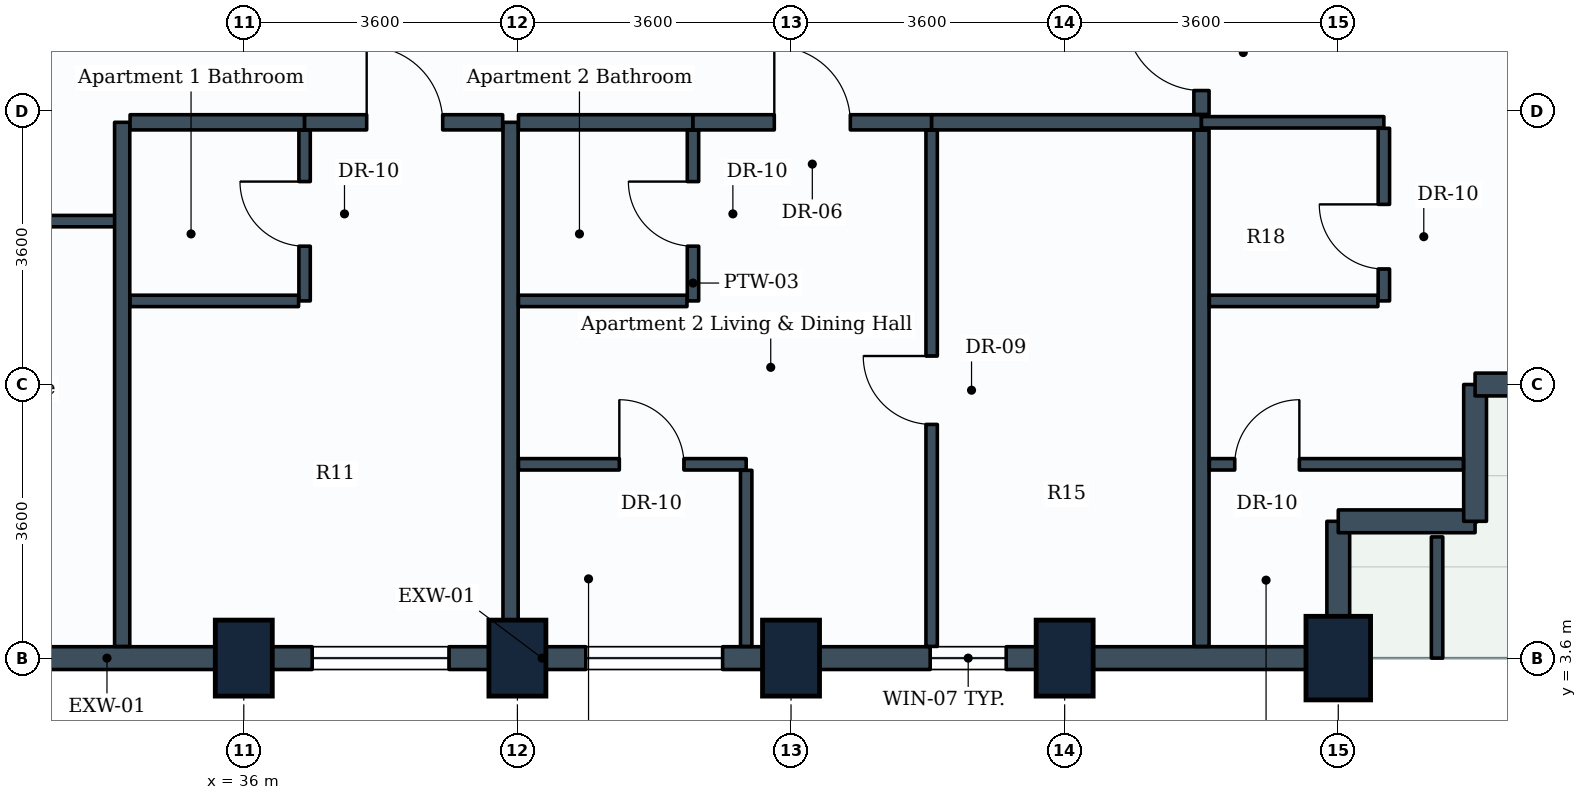
"""IFC4 building model, lengths in metres.
Left out: names, types, materials, properties, quantities, classifications, styles, units other than length and angle.
Written with IfcOpenShell. Run it as: python <this file> out.ifc"""

import sys

from ifc_helpers import new_model, si_unit, direction, frame, frame_2d, origin, origin_2d, place, context, subcontext, project, spatial, rectangle, extrude, element, fill, save


model = new_model("IFC4")
c1 = context("Model", 3, precision=1e-05, world=origin(), true_north=direction((0.0, 1.0)))
c2 = subcontext(c1, "Body", "Model", "MODEL_VIEW")
j1 = project(units=[si_unit("LENGTHUNIT", "METRE"), si_unit("PLANEANGLEUNIT", "RADIAN")], contexts=[c1])
p1 = place(None, origin())
s1 = spatial("IfcSite", under=j1, at=p1, CompositionType="ELEMENT")
p2 = place(p1, origin())
s2 = spatial("IfcBuilding", under=s1, at=p2, CompositionType="ELEMENT")
p3 = place(p2, frame((0.0, 0.0, 127.6)))
s3 = spatial("IfcBuildingStorey", under=s2, at=p3, CompositionType="ELEMENT", Elevation=127.6)
for number, where, z_axis, x_axis in (
    (1, (36.0, 3.6, 0.0), (0.0, 0.0, 1.0), (1.0, 0.0, 0.0)),
    (2, (39.6, 3.6, 0.0), (0.0, 0.0, 1.0), (1.0, 0.0, 0.0)),
    (3, (43.2, 3.6, 0.0), (0.0, 0.0, 1.0), (1.0, 0.0, 0.0)),
    (4, (46.8, 3.6, 0.0), (0.0, 0.0, 1.0), (1.0, 0.0, 0.0)),
):
    element("IfcColumn", number, at=place(p3, frame(where, z_axis=z_axis, x_axis=x_axis)), inside=s3, PredefinedType="COLUMN", context=c2, shape_type="SweptSolid", body=[
        extrude(rectangle(XDim=0.75, YDim=1.0, at=origin_2d()), origin(), (0.0, 0.0, 1.0), 3.8),
    ])
p4 = place(p3, frame((50.4, 3.6, 0.0), z_axis=(0.0, 0.0, 1.0), x_axis=(1.0, 0.0, 0.0)))
e5 = element("IfcColumn", 5, at=p4, inside=s3, PredefinedType="COLUMN", context=c2, shape_type="SweptSolid", body=[
    extrude(rectangle(XDim=0.85, YDim=1.1, at=origin_2d()), origin(), (0.0, 0.0, 1.0), 3.8),
])
p5 = place(p3, frame((36.0, 3.6, 0.0), z_axis=(0.0, 0.0, 1.0), x_axis=(-1.0, 0.0, 0.0)))
e6 = element("IfcWall", 6, at=p5, inside=s3, PredefinedType="STANDARD", context=c2, shape_type="SweptSolid", body=[
    extrude(rectangle(XDim=3.6, YDim=0.3, at=frame_2d((1.8, 0.0))), origin(), (0.0, 0.0, 1.0), 2.93),
])
p6 = place(p3, frame((39.6, 3.6, 0.0), z_axis=(0.0, 0.0, 1.0), x_axis=(-1.0, 0.0, 0.0)))
e7 = element("IfcWall", 7, at=p6, inside=s3, PredefinedType="STANDARD", context=c2, shape_type="SweptSolid", body=[
    extrude(rectangle(XDim=3.6, YDim=0.3, at=frame_2d((1.8, 0.0))), origin(), (0.0, 0.0, 1.0), 2.93),
])
p7 = place(p6, frame((0.9, 0.0, 0.85)))
e8 = element("IfcOpeningElement", 8, at=p7, cuts=e7, PredefinedType="OPENING", context=c2, shape_type="SweptSolid", body=[
    extrude(rectangle(XDim=1.8, YDim=1.35, at=frame_2d((0.9, 0.675))), frame((0.0, 0.16, 0.0), z_axis=(0.0, -1.0, 0.0), x_axis=(1.0, 0.0, 0.0)), (0.0, 0.0, 1.0), 0.32),
])
p8 = place(p3, frame((43.2, 3.6, 0.0), z_axis=(0.0, 0.0, 1.0), x_axis=(-1.0, 0.0, 0.0)))
e9 = element("IfcWall", 9, at=p8, inside=s3, PredefinedType="STANDARD", context=c2, shape_type="SweptSolid", body=[
    extrude(rectangle(XDim=3.6, YDim=0.3, at=frame_2d((1.8, 0.0))), origin(), (0.0, 0.0, 1.0), 2.93),
])
p9 = place(p8, frame((0.9, 0.0, 0.85)))
e10 = element("IfcOpeningElement", 10, at=p9, cuts=e9, PredefinedType="OPENING", context=c2, shape_type="SweptSolid", body=[
    extrude(rectangle(XDim=1.8, YDim=1.35, at=frame_2d((0.9, 0.675))), frame((0.0, 0.16, 0.0), z_axis=(0.0, -1.0, 0.0), x_axis=(1.0, 0.0, 0.0)), (0.0, 0.0, 1.0), 0.32),
])
p10 = place(p3, frame((46.8, 3.6, 0.0), z_axis=(0.0, 0.0, 1.0), x_axis=(-1.0, 0.0, 0.0)))
e11 = element("IfcWall", 11, at=p10, inside=s3, PredefinedType="STANDARD", context=c2, shape_type="SweptSolid", body=[
    extrude(rectangle(XDim=3.6, YDim=0.3, at=frame_2d((1.8, 0.0))), origin(), (0.0, 0.0, 1.0), 2.93),
])
p11 = place(p10, frame((0.769, 0.0, 0.85)))
e12 = element("IfcOpeningElement", 12, at=p11, cuts=e11, PredefinedType="OPENING", context=c2, shape_type="SweptSolid", body=[
    extrude(rectangle(XDim=1.0, YDim=1.35, at=frame_2d((0.5, 0.675))), frame((0.0, 0.16, 0.0), z_axis=(0.0, -1.0, 0.0), x_axis=(1.0, 0.0, 0.0)), (0.0, 0.0, 1.0), 0.32),
])
p12 = place(p3, frame((50.4, 3.6, 0.0), z_axis=(0.0, 0.0, 1.0), x_axis=(-1.0, 0.0, 0.0)))
e13 = element("IfcWall", 13, at=p12, inside=s3, PredefinedType="STANDARD", context=c2, shape_type="SweptSolid", body=[
    extrude(rectangle(XDim=3.6, YDim=0.3, at=frame_2d((1.8, 0.0))), origin(), (0.0, 0.0, 1.0), 2.93),
])
p13 = place(p3, frame((50.4, 5.4, 0.0), z_axis=(0.0, 0.0, 1.0), x_axis=(0.0, -1.0, 0.0)))
e14 = element("IfcWall", 14, at=p13, inside=s3, PredefinedType="STANDARD", context=c2, shape_type="SweptSolid", body=[
    extrude(rectangle(XDim=1.8, YDim=0.3, at=frame_2d((0.9, 0.0))), origin(), (0.0, 0.0, 1.0), 2.93),
])
for number, where, z_axis, x_axis in (
    (15, (52.2, 5.4, 0.0), (0.0, 0.0, 1.0), (-1.0, 0.0, 0.0)),
    (16, (52.2, 7.2, 0.0), (0.0, 0.0, 1.0), (0.0, -1.0, 0.0)),
):
    element("IfcWall", number, at=place(p3, frame(where, z_axis=z_axis, x_axis=x_axis)), inside=s3, PredefinedType="STANDARD", context=c2, shape_type="SweptSolid", body=[
        extrude(rectangle(XDim=1.8, YDim=0.3, at=frame_2d((0.9, 0.0))), origin(), (0.0, 0.0, 1.0), 3.535),
    ])
p14 = place(p3, frame((54.0, 7.2, 0.0), z_axis=(0.0, 0.0, 1.0), x_axis=(-1.0, 0.0, 0.0)))
e17 = element("IfcWall", 17, at=p14, inside=s3, PredefinedType="STANDARD", context=c2, shape_type="SweptSolid", body=[
    extrude(rectangle(XDim=1.8, YDim=0.3, at=frame_2d((0.9, 0.0))), origin(), (0.0, 0.0, 1.0), 2.93),
])
p15 = place(p3, frame((28.879, 9.35, 0.0), z_axis=(0.0, 0.0, 1.0), x_axis=(1.0, 0.0, 0.0)))
e18 = element("IfcWall", 18, at=p15, inside=s3, PredefinedType="PARTITIONING", context=c2, shape_type="SweptSolid", body=[
    extrude(rectangle(XDim=5.521, YDim=0.15, at=frame_2d((2.76, 0.0))), origin(), (0.0, 0.0, 1.0), 3.535),
])
p16 = place(p15, frame((0.36, 0.0, 0.0)))
e19 = element("IfcOpeningElement", 19, at=p16, cuts=e18, PredefinedType="OPENING", context=c2, shape_type="SweptSolid", body=[
    extrude(rectangle(XDim=1.0, YDim=2.1, at=frame_2d((0.5, 1.05))), frame((0.0, 0.085, 0.0), z_axis=(0.0, -1.0, 0.0), x_axis=(1.0, 0.0, 0.0)), (0.0, 0.0, 1.0), 0.17),
])
for number, where, z_axis, x_axis in (
    (20, (34.4, 3.754, 0.0), (0.0, 0.0, 1.0), (0.0, 1.0, 0.0)),
    (21, (39.51, 3.754, 0.0), (0.0, 0.0, 1.0), (0.0, 1.0, 0.0)),
):
    element("IfcWall", number, at=place(p3, frame(where, z_axis=z_axis, x_axis=x_axis)), inside=s3, PredefinedType="PARTITIONING", context=c2, shape_type="SweptSolid", body=[
        extrude(rectangle(XDim=6.896, YDim=0.2, at=frame_2d((3.448, 0.0))), origin(), (0.0, 0.0, 1.0), 2.93),
    ])
p17 = place(p3, frame((34.504, 10.65, 0.0), z_axis=(0.0, 0.0, 1.0), x_axis=(1.0, 0.0, 0.0)))
e22 = element("IfcWall", 22, at=p17, inside=s3, PredefinedType="PARTITIONING", context=c2, shape_type="SweptSolid", body=[
    extrude(rectangle(XDim=2.296, YDim=0.2, at=frame_2d((1.148, 0.0))), origin(), (0.0, 0.0, 1.0), 3.08),
])
p18 = place(p3, frame((36.8, 8.3, 0.0), z_axis=(0.0, 0.0, 1.0), x_axis=(0.0, 1.0, 0.0)))
e23 = element("IfcWall", 23, at=p18, inside=s3, PredefinedType="PARTITIONING", context=c2, shape_type="SweptSolid", body=[
    extrude(rectangle(XDim=2.246, YDim=0.15, at=frame_2d((1.123, 0.0))), origin(), (0.0, 0.0, 1.0), 3.535),
])
p19 = place(p18, frame((0.72, 0.0, 0.0)))
e24 = element("IfcOpeningElement", 24, at=p19, cuts=e23, PredefinedType="OPENING", context=c2, shape_type="SweptSolid", body=[
    extrude(rectangle(XDim=0.85, YDim=2.1, at=frame_2d((0.425, 1.05))), frame((0.0, 0.085, 0.0), z_axis=(0.0, -1.0, 0.0), x_axis=(1.0, 0.0, 0.0)), (0.0, 0.0, 1.0), 0.17),
])
p20 = place(p3, frame((34.504, 8.3, 0.0), z_axis=(0.0, 0.0, 1.0), x_axis=(1.0, 0.0, 0.0)))
e25 = element("IfcWall", 25, at=p20, inside=s3, PredefinedType="PARTITIONING", context=c2, shape_type="SweptSolid", body=[
    extrude(rectangle(XDim=2.217, YDim=0.15, at=frame_2d((1.108, 0.0))), origin(), (0.0, 0.0, 1.0), 3.22),
])
p21 = place(p3, frame((36.8, 10.65, 0.0), z_axis=(0.0, 0.0, 1.0), x_axis=(1.0, 0.0, 0.0)))
e26 = element("IfcWall", 26, at=p21, inside=s3, PredefinedType="PARTITIONING", context=c2, shape_type="SweptSolid", body=[
    extrude(rectangle(XDim=2.606, YDim=0.2, at=frame_2d((1.303, 0.0))), origin(), (0.0, 0.0, 1.0), 3.08),
])
p22 = place(p21, frame((0.817, 0.0, 0.0)))
e27 = element("IfcOpeningElement", 27, at=p22, cuts=e26, PredefinedType="OPENING", context=c2, shape_type="SweptSolid", body=[
    extrude(rectangle(XDim=1.0, YDim=2.1, at=frame_2d((0.5, 1.05))), frame((0.0, 0.11, 0.0), z_axis=(0.0, -1.0, 0.0), x_axis=(1.0, 0.0, 0.0)), (0.0, 0.0, 1.0), 0.22),
])
p23 = place(p3, frame((39.614, 10.65, 0.0), z_axis=(0.0, 0.0, 1.0), x_axis=(1.0, 0.0, 0.0)))
e28 = element("IfcWall", 28, at=p23, inside=s3, PredefinedType="PARTITIONING", context=c2, shape_type="SweptSolid", body=[
    extrude(rectangle(XDim=2.296, YDim=0.2, at=frame_2d((1.148, 0.0))), origin(), (0.0, 0.0, 1.0), 3.13),
])
p24 = place(p3, frame((41.91, 8.3, 0.0), z_axis=(0.0, 0.0, 1.0), x_axis=(0.0, 1.0, 0.0)))
e29 = element("IfcWall", 29, at=p24, inside=s3, PredefinedType="PARTITIONING", context=c2, shape_type="SweptSolid", body=[
    extrude(rectangle(XDim=2.246, YDim=0.15, at=frame_2d((1.123, 0.0))), origin(), (0.0, 0.0, 1.0), 3.535),
])
p25 = place(p24, frame((0.72, 0.0, 0.0)))
e30 = element("IfcOpeningElement", 30, at=p25, cuts=e29, PredefinedType="OPENING", context=c2, shape_type="SweptSolid", body=[
    extrude(rectangle(XDim=0.85, YDim=2.1, at=frame_2d((0.425, 1.05))), frame((0.0, 0.085, 0.0), z_axis=(0.0, -1.0, 0.0), x_axis=(1.0, 0.0, 0.0)), (0.0, 0.0, 1.0), 0.17),
])
p26 = place(p3, frame((39.614, 8.3, 0.0), z_axis=(0.0, 0.0, 1.0), x_axis=(1.0, 0.0, 0.0)))
e31 = element("IfcWall", 31, at=p26, inside=s3, PredefinedType="PARTITIONING", context=c2, shape_type="SweptSolid", body=[
    extrude(rectangle(XDim=2.217, YDim=0.15, at=frame_2d((1.108, 0.0))), origin(), (0.0, 0.0, 1.0), 3.17),
])
p27 = place(p3, frame((41.91, 10.65, 0.0), z_axis=(0.0, 0.0, 1.0), x_axis=(1.0, 0.0, 0.0)))
e32 = element("IfcWall", 32, at=p27, inside=s3, PredefinedType="PARTITIONING", context=c2, shape_type="SweptSolid", body=[
    extrude(rectangle(XDim=3.14, YDim=0.2, at=frame_2d((1.57, 0.0))), origin(), (0.0, 0.0, 1.0), 3.13),
])
p28 = place(p27, frame((1.07, 0.0, 0.0)))
e33 = element("IfcOpeningElement", 33, at=p28, cuts=e32, PredefinedType="OPENING", context=c2, shape_type="SweptSolid", body=[
    extrude(rectangle(XDim=1.0, YDim=2.1, at=frame_2d((0.5, 1.05))), frame((0.0, 0.11, 0.0), z_axis=(0.0, -1.0, 0.0), x_axis=(1.0, 0.0, 0.0)), (0.0, 0.0, 1.0), 0.22),
])
p29 = place(p3, frame((45.05, 10.65, 0.0), z_axis=(0.0, 0.0, 1.0), x_axis=(1.0, 0.0, 0.0)))
e34 = element("IfcWall", 34, at=p29, inside=s3, PredefinedType="PARTITIONING", context=c2, shape_type="SweptSolid", body=[
    extrude(rectangle(XDim=3.55, YDim=0.2, at=frame_2d((1.775, 0.0))), origin(), (0.0, 0.0, 1.0), 3.17),
])
p30 = place(p3, frame((45.05, 3.754, 0.0), z_axis=(0.0, 0.0, 1.0), x_axis=(0.0, 1.0, 0.0)))
e35 = element("IfcWall", 35, at=p30, inside=s3, PredefinedType="PARTITIONING", context=c2, shape_type="SweptSolid", body=[
    extrude(rectangle(XDim=6.792, YDim=0.15, at=frame_2d((3.396, 0.0))), origin(), (0.0, 0.0, 1.0), 2.93),
])
p31 = place(p30, frame((2.921, 0.0, 0.0)))
e36 = element("IfcOpeningElement", 36, at=p31, cuts=e35, PredefinedType="OPENING", context=c2, shape_type="SweptSolid", body=[
    extrude(rectangle(XDim=0.9, YDim=2.1, at=frame_2d((0.45, 1.05))), frame((0.0, 0.085, 0.0), z_axis=(0.0, -1.0, 0.0), x_axis=(1.0, 0.0, 0.0)), (0.0, 0.0, 1.0), 0.17),
])
p32 = place(p3, frame((39.614, 6.15, 0.0), z_axis=(0.0, 0.0, 1.0), x_axis=(1.0, 0.0, 0.0)))
e37 = element("IfcWall", 37, at=p32, inside=s3, PredefinedType="PARTITIONING", context=c2, shape_type="SweptSolid", body=[
    extrude(rectangle(XDim=2.996, YDim=0.15, at=frame_2d((1.498, 0.0))), origin(), (0.0, 0.0, 1.0), 3.17),
])
p33 = place(p32, frame((1.327, 0.0, 0.0)))
e38 = element("IfcOpeningElement", 38, at=p33, cuts=e37, PredefinedType="OPENING", context=c2, shape_type="SweptSolid", body=[
    extrude(rectangle(XDim=0.85, YDim=2.1, at=frame_2d((0.425, 1.05))), frame((0.0, 0.085, 0.0), z_axis=(0.0, -1.0, 0.0), x_axis=(1.0, 0.0, 0.0)), (0.0, 0.0, 1.0), 0.17),
])
p34 = place(p3, frame((42.61, 3.754, 0.0), z_axis=(0.0, 0.0, 1.0), x_axis=(0.0, 1.0, 0.0)))
e39 = element("IfcWall", 39, at=p34, inside=s3, PredefinedType="PARTITIONING", context=c2, shape_type="SweptSolid", body=[
    extrude(rectangle(XDim=2.317, YDim=0.15, at=frame_2d((1.159, 0.0))), origin(), (0.0, 0.0, 1.0), 2.93),
])
p35 = place(p3, frame((48.6, 3.754, 0.0), z_axis=(0.0, 0.0, 1.0), x_axis=(0.0, 1.0, 0.0)))
e40 = element("IfcWall", 40, at=p35, inside=s3, PredefinedType="PARTITIONING", context=c2, shape_type="SweptSolid", body=[
    extrude(rectangle(XDim=6.792, YDim=0.2, at=frame_2d((3.396, 0.0))), origin(), (0.0, 0.0, 1.0), 2.93),
])
p36 = place(p3, frame((48.6, 10.754, 0.0), z_axis=(0.0, 0.0, 1.0), x_axis=(0.0, 1.0, 0.0)))
e41 = element("IfcWall", 41, at=p36, inside=s3, PredefinedType="PARTITIONING", context=c2, shape_type="SweptSolid", body=[
    extrude(rectangle(XDim=1.667, YDim=0.2, at=frame_2d((0.833, 0.0))), origin(), (0.0, 0.0, 1.0), 3.535),
])
p37 = place(p36, frame((0.314, 0.0, 0.0)))
e42 = element("IfcOpeningElement", 42, at=p37, cuts=e41, PredefinedType="OPENING", context=c2, shape_type="SweptSolid", body=[
    extrude(rectangle(XDim=1.0, YDim=2.1, at=frame_2d((0.5, 1.05))), frame((0.0, 0.11, 0.0), z_axis=(0.0, -1.0, 0.0), x_axis=(1.0, 0.0, 0.0)), (0.0, 0.0, 1.0), 0.22),
])
p38 = place(p3, frame((48.6, 10.65, 0.0), z_axis=(0.0, 0.0, 1.0), x_axis=(1.0, 0.0, 0.0)))
e43 = element("IfcWall", 43, at=p38, inside=s3, PredefinedType="PARTITIONING", context=c2, shape_type="SweptSolid", body=[
    extrude(rectangle(XDim=2.4, YDim=0.15, at=frame_2d((1.2, 0.0))), origin(), (0.0, 0.0, 1.0), 3.535),
])
p39 = place(p3, frame((51.0, 8.3, 0.0), z_axis=(0.0, 0.0, 1.0), x_axis=(0.0, 1.0, 0.0)))
e44 = element("IfcWall", 44, at=p39, inside=s3, PredefinedType="PARTITIONING", context=c2, shape_type="SweptSolid", body=[
    extrude(rectangle(XDim=2.271, YDim=0.15, at=frame_2d((1.135, 0.0))), origin(), (0.0, 0.0, 1.0), 3.535),
])
p40 = place(p39, frame((0.42, 0.0, 0.0)))
e45 = element("IfcOpeningElement", 45, at=p40, cuts=e44, PredefinedType="OPENING", context=c2, shape_type="SweptSolid", body=[
    extrude(rectangle(XDim=0.85, YDim=2.1, at=frame_2d((0.425, 1.05))), frame((0.0, 0.085, 0.0), z_axis=(0.0, -1.0, 0.0), x_axis=(1.0, 0.0, 0.0)), (0.0, 0.0, 1.0), 0.17),
])
p41 = place(p3, frame((48.704, 8.3, 0.0), z_axis=(0.0, 0.0, 1.0), x_axis=(1.0, 0.0, 0.0)))
e46 = element("IfcWall", 46, at=p41, inside=s3, PredefinedType="PARTITIONING", context=c2, shape_type="SweptSolid", body=[
    extrude(rectangle(XDim=2.217, YDim=0.15, at=frame_2d((1.108, 0.0))), origin(), (0.0, 0.0, 1.0), 3.535),
])
p42 = place(p3, frame((48.704, 6.15, 0.0), z_axis=(0.0, 0.0, 1.0), x_axis=(1.0, 0.0, 0.0)))
e47 = element("IfcWall", 47, at=p42, inside=s3, PredefinedType="PARTITIONING", context=c2, shape_type="SweptSolid", body=[
    extrude(rectangle(XDim=3.342, YDim=0.15, at=frame_2d((1.671, 0.0))), origin(), (0.0, 0.0, 1.0), 3.535),
])
p43 = place(p42, frame((0.334, 0.0, 0.0)))
e48 = element("IfcOpeningElement", 48, at=p43, cuts=e47, PredefinedType="OPENING", context=c2, shape_type="SweptSolid", body=[
    extrude(rectangle(XDim=0.85, YDim=2.1, at=frame_2d((0.425, 1.05))), frame((0.0, 0.085, 0.0), z_axis=(0.0, -1.0, 0.0), x_axis=(1.0, 0.0, 0.0)), (0.0, 0.0, 1.0), 0.17),
])
p44 = place(p3, frame((51.7, 3.6, 0.0), z_axis=(0.0, 0.0, 1.0), x_axis=(0.0, 1.0, 0.0)))
e49 = element("IfcWall", 49, at=p44, inside=s3, PredefinedType="PARTITIONING", context=c2, shape_type="SweptSolid", body=[
    extrude(rectangle(XDim=1.595, YDim=0.15, at=frame_2d((0.797, 0.0))), origin(), (0.0, 0.0, 1.0), 3.535),
])
p45 = place(p7, origin())
e50 = element("IfcWindow", 50, at=p45, inside=s3, PartitioningType="SINGLE_PANEL", PredefinedType="WINDOW", context=c2, shape_type="SweptSolid", body=[
    extrude(rectangle(XDim=1.8, YDim=1.35, at=frame_2d((0.9, 0.675))), frame((0.0, 0.03, 0.0), z_axis=(0.0, -1.0, 0.0), x_axis=(1.0, 0.0, 0.0)), (0.0, 0.0, 1.0), 0.06),
])
fill(e8, e50)
p46 = place(p9, origin())
e51 = element("IfcWindow", 51, at=p46, inside=s3, PartitioningType="SINGLE_PANEL", PredefinedType="WINDOW", context=c2, shape_type="SweptSolid", body=[
    extrude(rectangle(XDim=1.8, YDim=1.35, at=frame_2d((0.9, 0.675))), frame((0.0, 0.03, 0.0), z_axis=(0.0, -1.0, 0.0), x_axis=(1.0, 0.0, 0.0)), (0.0, 0.0, 1.0), 0.06),
])
fill(e10, e51)
p47 = place(p19, origin())
e52 = element("IfcDoor", 52, at=p47, inside=s3, OperationType="SINGLE_SWING_RIGHT", PredefinedType="DOOR", context=c2, shape_type="SweptSolid", body=[
    extrude(rectangle(XDim=0.85, YDim=2.1, at=frame_2d((0.425, 1.05))), frame((0.0, 0.025, 0.0), z_axis=(0.0, -1.0, 0.0), x_axis=(1.0, 0.0, 0.0)), (0.0, 0.0, 1.0), 0.05),
])
fill(e24, e52)
p48 = place(p22, origin())
e53 = element("IfcDoor", 53, at=p48, inside=s3, OperationType="SINGLE_SWING_LEFT", PredefinedType="DOOR", context=c2, shape_type="SweptSolid", body=[
    extrude(rectangle(XDim=1.0, YDim=2.1, at=frame_2d((0.5, 1.05))), frame((0.0, 0.025, 0.0), z_axis=(0.0, -1.0, 0.0), x_axis=(1.0, 0.0, 0.0)), (0.0, 0.0, 1.0), 0.05),
])
fill(e27, e53)
p49 = place(p25, origin())
e54 = element("IfcDoor", 54, at=p49, inside=s3, OperationType="SINGLE_SWING_RIGHT", PredefinedType="DOOR", context=c2, shape_type="SweptSolid", body=[
    extrude(rectangle(XDim=0.85, YDim=2.1, at=frame_2d((0.425, 1.05))), frame((0.0, 0.025, 0.0), z_axis=(0.0, -1.0, 0.0), x_axis=(1.0, 0.0, 0.0)), (0.0, 0.0, 1.0), 0.05),
])
fill(e30, e54)
p50 = place(p28, origin())
e55 = element("IfcDoor", 55, at=p50, inside=s3, OperationType="SINGLE_SWING_LEFT", PredefinedType="DOOR", context=c2, shape_type="SweptSolid", body=[
    extrude(rectangle(XDim=1.0, YDim=2.1, at=frame_2d((0.5, 1.05))), frame((0.0, 0.025, 0.0), z_axis=(0.0, -1.0, 0.0), x_axis=(1.0, 0.0, 0.0)), (0.0, 0.0, 1.0), 0.05),
])
fill(e33, e55)
p51 = place(p31, origin())
e56 = element("IfcDoor", 56, at=p51, inside=s3, OperationType="SINGLE_SWING_RIGHT", PredefinedType="DOOR", context=c2, shape_type="SweptSolid", body=[
    extrude(rectangle(XDim=0.9, YDim=2.1, at=frame_2d((0.45, 1.05))), frame((0.0, 0.025, 0.0), z_axis=(0.0, -1.0, 0.0), x_axis=(1.0, 0.0, 0.0)), (0.0, 0.0, 1.0), 0.05),
])
fill(e36, e56)
p52 = place(p33, origin())
e57 = element("IfcDoor", 57, at=p52, inside=s3, OperationType="SINGLE_SWING_LEFT", PredefinedType="DOOR", context=c2, shape_type="SweptSolid", body=[
    extrude(rectangle(XDim=0.85, YDim=2.1, at=frame_2d((0.425, 1.05))), frame((0.0, 0.025, 0.0), z_axis=(0.0, -1.0, 0.0), x_axis=(1.0, 0.0, 0.0)), (0.0, 0.0, 1.0), 0.05),
])
fill(e38, e57)
p53 = place(p37, origin())
e58 = element("IfcDoor", 58, at=p53, inside=s3, OperationType="SINGLE_SWING_RIGHT", PredefinedType="DOOR", context=c2, shape_type="SweptSolid", body=[
    extrude(rectangle(XDim=1.0, YDim=2.1, at=frame_2d((0.5, 1.05))), frame((0.0, 0.025, 0.0), z_axis=(0.0, -1.0, 0.0), x_axis=(1.0, 0.0, 0.0)), (0.0, 0.0, 1.0), 0.05),
])
fill(e42, e58)
p54 = place(p40, origin())
e59 = element("IfcDoor", 59, at=p54, inside=s3, OperationType="SINGLE_SWING_RIGHT", PredefinedType="DOOR", context=c2, shape_type="SweptSolid", body=[
    extrude(rectangle(XDim=0.85, YDim=2.1, at=frame_2d((0.425, 1.05))), frame((0.0, 0.025, 0.0), z_axis=(0.0, -1.0, 0.0), x_axis=(1.0, 0.0, 0.0)), (0.0, 0.0, 1.0), 0.05),
])
fill(e45, e59)
p55 = place(p43, origin())
e60 = element("IfcDoor", 60, at=p55, inside=s3, OperationType="SINGLE_SWING_RIGHT", PredefinedType="DOOR", context=c2, shape_type="SweptSolid", body=[
    extrude(rectangle(XDim=0.85, YDim=2.1, at=frame_2d((0.425, 1.05))), frame((0.0, 0.025, 0.0), z_axis=(0.0, -1.0, 0.0), x_axis=(1.0, 0.0, 0.0)), (0.0, 0.0, 1.0), 0.05),
])
fill(e48, e60)
p56 = place(p11, origin())
e61 = element("IfcWindow", 61, at=p56, inside=s3, PartitioningType="SINGLE_PANEL", PredefinedType="WINDOW", context=c2, shape_type="SweptSolid", body=[
    extrude(rectangle(XDim=1.0, YDim=1.35, at=frame_2d((0.5, 0.675))), frame((0.0, 0.03, 0.0), z_axis=(0.0, -1.0, 0.0), x_axis=(1.0, 0.0, 0.0)), (0.0, 0.0, 1.0), 0.06),
])
fill(e12, e61)
save(model, sys.argv[1])
